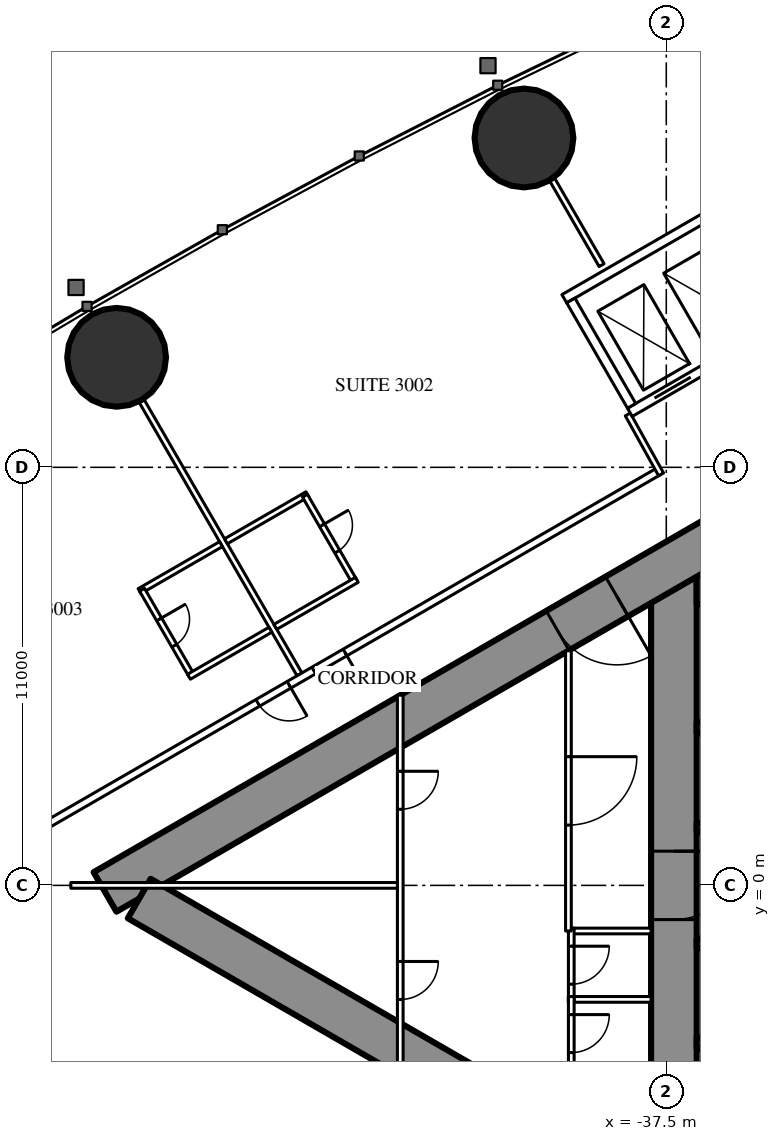
"""IFC4 building model, lengths in metres.
Left out: names, types, materials, properties, quantities, classifications, styles, units other than length and angle.
Written with IfcOpenShell. Run it as: python <this file> out.ifc"""

import sys

from ifc_helpers import new_model, si_unit, direction, frame, frame_2d, origin, origin_2d, place, context, subcontext, project, spatial, rectangle, hollow_circle, extrude, element, fill, save


model = new_model("IFC4")
c1 = context("Model", 3, precision=1e-05, world=origin(), true_north=direction((0.0, 1.0)))
c2 = subcontext(c1, "Body", "Model", "MODEL_VIEW")
j1 = project(units=[si_unit("LENGTHUNIT", "METRE"), si_unit("PLANEANGLEUNIT", "RADIAN")], contexts=[c1])
p1 = place(None, origin())
s1 = spatial("IfcSite", under=j1, at=p1, CompositionType="ELEMENT")
p2 = place(p1, origin())
s2 = spatial("IfcBuilding", under=s1, at=p2, CompositionType="ELEMENT")
p3 = place(p2, frame((0.0, 0.0, 115.1)))
s3 = spatial("IfcBuildingStorey", under=s2, at=p3, CompositionType="ELEMENT", Elevation=115.1)
for number, where, z_axis, x_axis in (
    (1, (-41.245, 19.666, 0.0), (0.0, 0.0, 1.0), (1.0, 0.0, 0.0)),
    (2, (-51.963, 13.895, 0.0), (0.0, 0.0, 1.0), (1.0, 0.0, 0.0)),
):
    element("IfcColumn", number, at=place(p3, frame(where, z_axis=z_axis, x_axis=x_axis)), inside=s3, PredefinedType="COLUMN", context=c2, shape_type="SweptSolid", body=[
        extrude(hollow_circle(Radius=1.3, WallThickness=0.1, at=origin_2d()), origin(), (0.0, 0.0, 1.0), 3.5),
    ])
p4 = place(p3, frame((-37.3, 8.6, 0.0), z_axis=(0.0, 0.0, 1.0), x_axis=(0.0, -1.0, 0.0)))
e3 = element("IfcWall", 3, at=p4, inside=s3, PredefinedType="SHEAR", context=c2, shape_type="SweptSolid", body=[
    extrude(rectangle(XDim=17.2, YDim=1.2, at=frame_2d((8.6, 0.0))), origin(), (0.0, 0.0, 1.0), 3.5),
])
p5 = place(p4, frame((7.7, 0.0, 0.0)))
e4 = element("IfcOpeningElement", 4, at=p5, cuts=e3, PredefinedType="OPENING", context=c2, shape_type="SweptSolid", body=[
    extrude(rectangle(XDim=1.8, YDim=2.2, at=frame_2d((0.9, 1.1))), frame((0.0, 0.61, 0.0), z_axis=(0.0, -1.0, 0.0), x_axis=(1.0, 0.0, 0.0)), (0.0, 0.0, 1.0), 1.22),
])
p6 = place(p3, frame((-28.3, 8.0, 0.0), z_axis=(0.0, 0.0, 1.0), x_axis=(-1.0, 0.0, 0.0)))
e5 = element("IfcWall", 5, at=p6, inside=s3, PredefinedType="SHEAR", context=c2, shape_type="SweptSolid", body=[
    extrude(rectangle(XDim=8.4, YDim=1.2, at=frame_2d((4.2, 0.0))), origin(), (0.0, 0.0, 1.0), 3.5),
])
p7 = place(p6, frame((0.25, 0.0, 0.0)))
e6 = element("IfcOpeningElement", 6, at=p7, cuts=e5, PredefinedType="OPENING", context=c2, shape_type="SweptSolid", body=[
    extrude(rectangle(XDim=1.0, YDim=2.2, at=frame_2d((0.5, 1.1))), frame((0.0, 0.61, 0.0), z_axis=(0.0, -1.0, 0.0), x_axis=(1.0, 0.0, 0.0)), (0.0, 0.0, 1.0), 1.22),
])
for number, where, z_axis, x_axis in (
    (7, (-28.3, 4.15, 0.0), (0.0, 0.0, 1.0), (-1.0, 0.0, 0.0)),
    (8, (-28.3, -4.15, 0.0), (0.0, 0.0, 1.0), (-1.0, 0.0, 0.0)),
):
    element("IfcWall", number, at=place(p3, frame(where, z_axis=z_axis, x_axis=x_axis)), inside=s3, PredefinedType="SHEAR", context=c2, shape_type="SweptSolid", body=[
        extrude(rectangle(XDim=8.4, YDim=0.3, at=frame_2d((4.2, 0.0))), origin(), (0.0, 0.0, 1.0), 3.5),
    ])
for number, where, z_axis, x_axis in (
    (9, (-34.25, 1.525, 0.0), (0.0, 0.0, 1.0), (-1.0, 0.0, 0.0)),
    (10, (-34.25, -1.525, 0.0), (0.0, 0.0, 1.0), (-1.0, 0.0, 0.0)),
):
    element("IfcWall", number, at=place(p3, frame(where, z_axis=z_axis, x_axis=x_axis)), inside=s3, PredefinedType="SHEAR", context=c2, shape_type="SweptSolid", body=[
        extrude(rectangle(XDim=2.45, YDim=0.25, at=frame_2d((1.225, 0.0))), origin(), (0.0, 0.0, 1.0), 3.5),
    ])
p8 = place(p3, frame((-27.2, 14.3, 0.0), z_axis=(0.0, 0.0, 1.0), x_axis=(-0.866026593062, -0.499997940104, 0.0)))
e11 = element("IfcWall", 11, at=p8, inside=s3, PredefinedType="SHEAR", context=c2, shape_type="SweptSolid", body=[
    extrude(rectangle(XDim=28.946, YDim=1.2, at=frame_2d((14.473, 0.0))), origin(), (0.0, 0.0, 1.0), 3.5),
])
p9 = place(p8, frame((4.6, 0.0, 0.0)))
e12 = element("IfcOpeningElement", 12, at=p9, cuts=e11, PredefinedType="OPENING", context=c2, shape_type="SweptSolid", body=[
    extrude(rectangle(XDim=1.0, YDim=2.2, at=frame_2d((0.5, 1.1))), frame((0.0, 0.61, 0.0), z_axis=(0.0, -1.0, 0.0), x_axis=(1.0, 0.0, 0.0)), (0.0, 0.0, 1.0), 1.22),
])
p10 = place(p8, frame((13.395, 0.0, 0.0)))
e13 = element("IfcOpeningElement", 13, at=p10, cuts=e11, PredefinedType="OPENING", context=c2, shape_type="SweptSolid", body=[
    extrude(rectangle(XDim=1.8, YDim=2.2, at=frame_2d((0.9, 1.1))), frame((0.0, 0.61, 0.0), z_axis=(0.0, -1.0, 0.0), x_axis=(1.0, 0.0, 0.0)), (0.0, 0.0, 1.0), 1.22),
])
p11 = place(p3, frame((-27.2, -14.3, 0.0), z_axis=(0.0, 0.0, 1.0), x_axis=(-0.866024021859, 0.500002393557, 0.0)))
e14 = element("IfcWall", 14, at=p11, inside=s3, PredefinedType="SHEAR", context=c2, shape_type="SweptSolid", body=[
    extrude(rectangle(XDim=27.907, YDim=1.2, at=frame_2d((13.954, 0.0))), origin(), (0.0, 0.0, 1.0), 3.5),
])
p12 = place(p11, frame((4.6, 0.0, 0.0)))
e15 = element("IfcOpeningElement", 15, at=p12, cuts=e14, PredefinedType="OPENING", context=c2, shape_type="SweptSolid", body=[
    extrude(rectangle(XDim=1.0, YDim=2.2, at=frame_2d((0.5, 1.1))), frame((0.0, 0.61, 0.0), z_axis=(0.0, -1.0, 0.0), x_axis=(1.0, 0.0, 0.0)), (0.0, 0.0, 1.0), 1.22),
])
p13 = place(p11, frame((13.395, 0.0, 0.0)))
e16 = element("IfcOpeningElement", 16, at=p13, cuts=e14, PredefinedType="OPENING", context=c2, shape_type="SweptSolid", body=[
    extrude(rectangle(XDim=1.8, YDim=2.2, at=frame_2d((0.9, 1.1))), frame((0.0, 0.61, 0.0), z_axis=(0.0, -1.0, 0.0), x_axis=(1.0, 0.0, 0.0)), (0.0, 0.0, 1.0), 1.22),
])
p14 = place(p3, frame((-47.151, 5.552, 0.0), z_axis=(0.0, 0.0, 1.0), x_axis=(-0.500003012045, 0.866023664773, 0.0)))
e17 = element("IfcWall", 17, at=p14, inside=s3, PredefinedType="PARTITIONING", context=c2, shape_type="SweptSolid", body=[
    extrude(rectangle(XDim=8.311, YDim=0.15, at=frame_2d((4.156, 0.0))), origin(), (0.0, 0.0, 1.0), 2.2),
])
p15 = place(p3, frame((-39.202, 16.32, 0.0), z_axis=(0.0, 0.0, 1.0), x_axis=(-0.499947391036, 0.866055775454, 0.0)))
e18 = element("IfcWall", 18, at=p15, inside=s3, PredefinedType="PARTITIONING", context=c2, shape_type="SweptSolid", body=[
    extrude(rectangle(XDim=2.599, YDim=0.15, at=frame_2d((1.3, 0.0))), origin(), (0.0, 0.0, 1.0), 3.25),
])
p16 = place(p3, frame((-37.7, 10.894, 0.0), z_axis=(0.0, 0.0, 1.0), x_axis=(-0.866027905338, -0.499995667157, 0.0)))
e19 = element("IfcWall", 19, at=p16, inside=s3, PredefinedType="PARTITIONING", context=c2, shape_type="SweptSolid", body=[
    extrude(rectangle(XDim=21.787, YDim=0.2, at=frame_2d((10.894, 0.0))), origin(), (0.0, 0.0, 1.0), 3.25),
])
p17 = place(p16, frame((11.23, 0.0, 0.0)))
e20 = element("IfcOpeningElement", 20, at=p17, cuts=e19, PredefinedType="OPENING", context=c2, shape_type="SweptSolid", body=[
    extrude(rectangle(XDim=0.95, YDim=2.2, at=frame_2d((0.475, 1.1))), frame((0.0, 0.11, 0.0), z_axis=(0.0, -1.0, 0.0), x_axis=(1.0, 0.0, 0.0)), (0.0, 0.0, 1.0), 0.22),
])
p18 = place(p16, frame((9.531, 0.0, 0.0)))
e21 = element("IfcOpeningElement", 21, at=p18, cuts=e19, PredefinedType="OPENING", context=c2, shape_type="SweptSolid", body=[
    extrude(rectangle(XDim=0.95, YDim=2.2, at=frame_2d((0.475, 1.1))), frame((0.0, 0.11, 0.0), z_axis=(0.0, -1.0, 0.0), x_axis=(1.0, 0.0, 0.0)), (0.0, 0.0, 1.0), 0.22),
])
p19 = place(p3, frame((-38.513, 12.392, 0.0), z_axis=(0.0, 0.0, 1.0), x_axis=(0.485585508183, -0.874189175317, 0.0)))
e22 = element("IfcWall", 22, at=p19, inside=s3, PredefinedType="PARTITIONING", context=c2, shape_type="SweptSolid", body=[
    extrude(rectangle(XDim=1.805, YDim=0.15, at=frame_2d((0.902, 0.0))), origin(), (0.0, 0.0, 1.0), 3.25),
])
p20 = place(p3, frame((-49.216, 8.979, 0.0), z_axis=(0.0, 0.0, 1.0), x_axis=(-0.866031185235, -0.4999899861, 0.0)))
e23 = element("IfcWall", 23, at=p20, inside=s3, PredefinedType="PARTITIONING", context=c2, shape_type="SweptSolid", body=[
    extrude(rectangle(XDim=2.475, YDim=0.15, at=frame_2d((1.238, 0.0))), origin(), (0.0, 0.0, 1.0), 3.25),
])
p21 = place(p3, frame((-49.995, 5.527, 0.0), z_axis=(0.0, 0.0, 1.0), x_axis=(-0.500006934395, 0.866021400173, 0.0)))
e24 = element("IfcWall", 24, at=p21, inside=s3, PredefinedType="PARTITIONING", context=c2, shape_type="SweptSolid", body=[
    extrude(rectangle(XDim=2.6, YDim=0.15, at=frame_2d((1.3, 0.0))), origin(), (0.0, 0.0, 1.0), 3.25),
])
p22 = place(p21, frame((0.9, 0.0, 0.0)))
e25 = element("IfcOpeningElement", 25, at=p22, cuts=e24, PredefinedType="OPENING", context=c2, shape_type="SweptSolid", body=[
    extrude(rectangle(XDim=0.8, YDim=2.2, at=frame_2d((0.4, 1.1))), frame((0.0, 0.085, 0.0), z_axis=(0.0, -1.0, 0.0), x_axis=(1.0, 0.0, 0.0)), (0.0, 0.0, 1.0), 0.17),
])
p23 = place(p3, frame((-47.916, 6.727, 0.0), z_axis=(0.0, 0.0, 1.0), x_axis=(-0.866031185235, -0.4999899861, 0.0)))
e26 = element("IfcWall", 26, at=p23, inside=s3, PredefinedType="PARTITIONING", context=c2, shape_type="SweptSolid", body=[
    extrude(rectangle(XDim=2.475, YDim=0.15, at=frame_2d((1.238, 0.0))), origin(), (0.0, 0.0, 1.0), 3.25),
])
p24 = place(p3, frame((-46.943, 10.292, 0.0), z_axis=(0.0, 0.0, 1.0), x_axis=(-0.866006523861, -0.500032699561, 0.0)))
e27 = element("IfcWall", 27, at=p24, inside=s3, PredefinedType="PARTITIONING", context=c2, shape_type="SweptSolid", body=[
    extrude(rectangle(XDim=2.475, YDim=0.15, at=frame_2d((1.237, 0.0))), origin(), (0.0, 0.0, 1.0), 3.25),
])
p25 = place(p3, frame((-45.708, 8.002, 0.0), z_axis=(0.0, 0.0, 1.0), x_axis=(-0.500047596559, 0.865997922154, 0.0)))
e28 = element("IfcWall", 28, at=p25, inside=s3, PredefinedType="PARTITIONING", context=c2, shape_type="SweptSolid", body=[
    extrude(rectangle(XDim=2.6, YDim=0.15, at=frame_2d((1.3, 0.0))), origin(), (0.0, 0.0, 1.0), 3.25),
])
p26 = place(p25, frame((0.9, 0.0, 0.0)))
e29 = element("IfcOpeningElement", 29, at=p26, cuts=e28, PredefinedType="OPENING", context=c2, shape_type="SweptSolid", body=[
    extrude(rectangle(XDim=0.8, YDim=2.2, at=frame_2d((0.4, 1.1))), frame((0.0, 0.085, 0.0), z_axis=(0.0, -1.0, 0.0), x_axis=(1.0, 0.0, 0.0)), (0.0, 0.0, 1.0), 0.17),
])
p27 = place(p3, frame((-45.643, 8.04, 0.0), z_axis=(0.0, 0.0, 1.0), x_axis=(-0.866006523861, -0.500032699561, 0.0)))
e30 = element("IfcWall", 30, at=p27, inside=s3, PredefinedType="PARTITIONING", context=c2, shape_type="SweptSolid", body=[
    extrude(rectangle(XDim=2.475, YDim=0.15, at=frame_2d((1.237, 0.0))), origin(), (0.0, 0.0, 1.0), 3.25),
])
for number, where, z_axis, x_axis in (
    (31, (-37.9, -1.2, 0.0), (0.0, 0.0, 1.0), (-1.0, 0.0, 0.0)),
    (32, (-37.9, -3.0, 0.0), (0.0, 0.0, 1.0), (-1.0, 0.0, 0.0)),
):
    element("IfcWall", number, at=place(p3, frame(where, z_axis=z_axis, x_axis=x_axis)), inside=s3, PredefinedType="PARTITIONING", context=c2, shape_type="SweptSolid", body=[
        extrude(rectangle(XDim=2.175, YDim=0.15, at=frame_2d((1.087, 0.0))), origin(), (0.0, 0.0, 1.0), 3.25),
    ])
p28 = place(p3, frame((-40.0, -1.125, 0.0), z_axis=(0.0, 0.0, 1.0), x_axis=(0.0, -1.0, 0.0)))
e33 = element("IfcWall", 33, at=p28, inside=s3, PredefinedType="PARTITIONING", context=c2, shape_type="SweptSolid", body=[
    extrude(rectangle(XDim=1.95, YDim=0.15, at=frame_2d((0.975, 0.0))), origin(), (0.0, 0.0, 1.0), 3.25),
])
p29 = place(p28, frame((0.475, 0.0, 0.0)))
e34 = element("IfcOpeningElement", 34, at=p29, cuts=e33, PredefinedType="OPENING", context=c2, shape_type="SweptSolid", body=[
    extrude(rectangle(XDim=1.0, YDim=2.2, at=frame_2d((0.5, 1.1))), frame((0.0, 0.085, 0.0), z_axis=(0.0, -1.0, 0.0), x_axis=(1.0, 0.0, 0.0)), (0.0, 0.0, 1.0), 0.17),
])
p30 = place(p3, frame((-40.0, -2.925, 0.0), z_axis=(0.0, 0.0, 1.0), x_axis=(0.0, -1.0, 0.0)))
e35 = element("IfcWall", 35, at=p30, inside=s3, PredefinedType="PARTITIONING", context=c2, shape_type="SweptSolid", body=[
    extrude(rectangle(XDim=1.95, YDim=0.15, at=frame_2d((0.975, 0.0))), origin(), (0.0, 0.0, 1.0), 3.25),
])
p31 = place(p30, frame((0.475, 0.0, 0.0)))
e36 = element("IfcOpeningElement", 36, at=p31, cuts=e35, PredefinedType="OPENING", context=c2, shape_type="SweptSolid", body=[
    extrude(rectangle(XDim=1.0, YDim=2.2, at=frame_2d((0.5, 1.1))), frame((0.0, 0.085, 0.0), z_axis=(0.0, -1.0, 0.0), x_axis=(1.0, 0.0, 0.0)), (0.0, 0.0, 1.0), 0.17),
])
p32 = place(p3, frame((-40.075, 6.174, 0.0), z_axis=(0.0, 0.0, 1.0), x_axis=(0.0, -1.0, 0.0)))
e37 = element("IfcWall", 37, at=p32, inside=s3, PredefinedType="PARTITIONING", context=c2, shape_type="SweptSolid", body=[
    extrude(rectangle(XDim=7.374, YDim=0.15, at=frame_2d((3.687, 0.0))), origin(), (0.0, 0.0, 1.0), 3.25),
])
p33 = place(p32, frame((2.787, 0.0, 0.0)))
e38 = element("IfcOpeningElement", 38, at=p33, cuts=e37, PredefinedType="OPENING", context=c2, shape_type="SweptSolid", body=[
    extrude(rectangle(XDim=1.8, YDim=2.2, at=frame_2d((0.9, 1.1))), frame((0.0, 0.085, 0.0), z_axis=(0.0, -1.0, 0.0), x_axis=(1.0, 0.0, 0.0)), (0.0, 0.0, 1.0), 0.17),
])
p34 = place(p3, frame((-44.5, 5.005, 0.0), z_axis=(0.0, 0.0, 1.0), x_axis=(0.0, -1.0, 0.0)))
e39 = element("IfcWall", 39, at=p34, inside=s3, PredefinedType="PARTITIONING", context=c2, shape_type="SweptSolid", body=[
    extrude(rectangle(XDim=10.009, YDim=0.15, at=frame_2d((5.005, 0.0))), origin(), (0.0, 0.0, 1.0), 2.45),
])
p35 = place(p34, frame((2.002, 0.0, 0.0)))
e40 = element("IfcOpeningElement", 40, at=p35, cuts=e39, PredefinedType="OPENING", context=c2, shape_type="SweptSolid", body=[
    extrude(rectangle(XDim=1.0, YDim=2.2, at=frame_2d((0.5, 1.1))), frame((0.0, 0.085, 0.0), z_axis=(0.0, -1.0, 0.0), x_axis=(1.0, 0.0, 0.0)), (0.0, 0.0, 1.0), 0.17),
])
p36 = place(p34, frame((7.007, 0.0, 0.0)))
e41 = element("IfcOpeningElement", 41, at=p36, cuts=e39, PredefinedType="OPENING", context=c2, shape_type="SweptSolid", body=[
    extrude(rectangle(XDim=1.0, YDim=2.2, at=frame_2d((0.5, 1.1))), frame((0.0, 0.085, 0.0), z_axis=(0.0, -1.0, 0.0), x_axis=(1.0, 0.0, 0.0)), (0.0, 0.0, 1.0), 0.17),
])
p37 = place(p3, frame((-44.575, 0.0, 0.0), z_axis=(0.0, 0.0, 1.0), x_axis=(-1.0, 0.0, 0.0)))
e42 = element("IfcWall", 42, at=p37, inside=s3, PredefinedType="PARTITIONING", context=c2, shape_type="SweptSolid", body=[
    extrude(rectangle(XDim=8.593, YDim=0.15, at=frame_2d((4.297, 0.0))), origin(), (0.0, 0.0, 1.0), 2.2),
])
p38 = place(p3, frame((-31.01, 16.747, 0.0), z_axis=(0.0, 0.0, 1.0), x_axis=(-0.866028165386, -0.499995216735, 0.0)))
e43 = element("IfcWall", 43, at=p38, inside=s3, PredefinedType="PARTITIONING", context=c2, shape_type="SweptSolid", body=[
    extrude(rectangle(XDim=8.6, YDim=0.25, at=frame_2d((4.3, 0.0))), origin(), (0.0, 0.0, 1.0), 3.25),
])
p39 = place(p38, frame((0.75, 0.0, 0.0)))
e44 = element("IfcOpeningElement", 44, at=p39, cuts=e43, PredefinedType="OPENING", context=c2, shape_type="SweptSolid", body=[
    extrude(rectangle(XDim=1.1, YDim=2.2, at=frame_2d((0.55, 1.1))), frame((0.0, 0.135, 0.0), z_axis=(0.0, -1.0, 0.0), x_axis=(1.0, 0.0, 0.0)), (0.0, 0.0, 1.0), 0.27),
])
p40 = place(p38, frame((2.75, 0.0, 0.0)))
e45 = element("IfcOpeningElement", 45, at=p40, cuts=e43, PredefinedType="OPENING", context=c2, shape_type="SweptSolid", body=[
    extrude(rectangle(XDim=1.1, YDim=2.2, at=frame_2d((0.55, 1.1))), frame((0.0, 0.135, 0.0), z_axis=(0.0, -1.0, 0.0), x_axis=(1.0, 0.0, 0.0)), (0.0, 0.0, 1.0), 0.27),
])
p41 = place(p38, frame((4.75, 0.0, 0.0)))
e46 = element("IfcOpeningElement", 46, at=p41, cuts=e43, PredefinedType="OPENING", context=c2, shape_type="SweptSolid", body=[
    extrude(rectangle(XDim=1.1, YDim=2.2, at=frame_2d((0.55, 1.1))), frame((0.0, 0.135, 0.0), z_axis=(0.0, -1.0, 0.0), x_axis=(1.0, 0.0, 0.0)), (0.0, 0.0, 1.0), 0.27),
])
p42 = place(p38, frame((6.75, 0.0, 0.0)))
e47 = element("IfcOpeningElement", 47, at=p42, cuts=e43, PredefinedType="OPENING", context=c2, shape_type="SweptSolid", body=[
    extrude(rectangle(XDim=1.1, YDim=2.2, at=frame_2d((0.55, 1.1))), frame((0.0, 0.135, 0.0), z_axis=(0.0, -1.0, 0.0), x_axis=(1.0, 0.0, 0.0)), (0.0, 0.0, 1.0), 0.27),
])
p43 = place(p3, frame((-32.736, 19.736, 0.0), z_axis=(0.0, 0.0, 1.0), x_axis=(-0.866028165386, -0.499995216735, 0.0)))
e48 = element("IfcWall", 48, at=p43, inside=s3, PredefinedType="PARTITIONING", context=c2, shape_type="SweptSolid", body=[
    extrude(rectangle(XDim=8.6, YDim=0.25, at=frame_2d((4.3, 0.0))), origin(), (0.0, 0.0, 1.0), 3.25),
])
p44 = place(p3, frame((-38.413, 12.618, 0.0), z_axis=(0.0, 0.0, 1.0), x_axis=(-0.499872130319, 0.866099216793, 0.0)))
e49 = element("IfcWall", 49, at=p44, inside=s3, PredefinedType="PARTITIONING", context=c2, shape_type="SweptSolid", body=[
    extrude(rectangle(XDim=3.2, YDim=0.25, at=frame_2d((1.6, 0.0))), origin(), (0.0, 0.0, 1.0), 3.25),
])
p45 = place(p22, origin())
e50 = element("IfcDoor", 50, at=p45, inside=s3, OperationType="SINGLE_SWING_RIGHT", PredefinedType="DOOR", context=c2, shape_type="SweptSolid", body=[
    extrude(rectangle(XDim=0.8, YDim=2.2, at=frame_2d((0.4, 1.1))), frame((0.0, 0.025, 0.0), z_axis=(0.0, -1.0, 0.0), x_axis=(1.0, 0.0, 0.0)), (0.0, 0.0, 1.0), 0.05),
])
fill(e25, e50)
p46 = place(p17, origin())
e51 = element("IfcDoor", 51, at=p46, inside=s3, OperationType="SINGLE_SWING_LEFT", PredefinedType="DOOR", context=c2, shape_type="SweptSolid", body=[
    extrude(rectangle(XDim=0.95, YDim=2.2, at=frame_2d((0.475, 1.1))), frame((0.0, 0.025, 0.0), z_axis=(0.0, -1.0, 0.0), x_axis=(1.0, 0.0, 0.0)), (0.0, 0.0, 1.0), 0.05),
])
fill(e20, e51)
p47 = place(p26, origin())
e52 = element("IfcDoor", 52, at=p47, inside=s3, OperationType="SINGLE_SWING_RIGHT", PredefinedType="DOOR", context=c2, shape_type="SweptSolid", body=[
    extrude(rectangle(XDim=0.8, YDim=2.2, at=frame_2d((0.4, 1.1))), frame((0.0, 0.025, 0.0), z_axis=(0.0, -1.0, 0.0), x_axis=(1.0, 0.0, 0.0)), (0.0, 0.0, 1.0), 0.05),
])
fill(e29, e52)
p48 = place(p18, origin())
e53 = element("IfcDoor", 53, at=p48, inside=s3, OperationType="SINGLE_SWING_LEFT", PredefinedType="DOOR", context=c2, shape_type="SweptSolid", body=[
    extrude(rectangle(XDim=0.95, YDim=2.2, at=frame_2d((0.475, 1.1))), frame((0.0, 0.025, 0.0), z_axis=(0.0, -1.0, 0.0), x_axis=(1.0, 0.0, 0.0)), (0.0, 0.0, 1.0), 0.05),
])
fill(e21, e53)
p49 = place(p29, origin())
e54 = element("IfcDoor", 54, at=p49, inside=s3, OperationType="SINGLE_SWING_LEFT", PredefinedType="DOOR", context=c2, shape_type="SweptSolid", body=[
    extrude(rectangle(XDim=1.0, YDim=2.2, at=frame_2d((0.5, 1.1))), frame((0.0, 0.025, 0.0), z_axis=(0.0, -1.0, 0.0), x_axis=(1.0, 0.0, 0.0)), (0.0, 0.0, 1.0), 0.05),
])
fill(e34, e54)
p50 = place(p31, origin())
e55 = element("IfcDoor", 55, at=p50, inside=s3, OperationType="SINGLE_SWING_LEFT", PredefinedType="DOOR", context=c2, shape_type="SweptSolid", body=[
    extrude(rectangle(XDim=1.0, YDim=2.2, at=frame_2d((0.5, 1.1))), frame((0.0, 0.025, 0.0), z_axis=(0.0, -1.0, 0.0), x_axis=(1.0, 0.0, 0.0)), (0.0, 0.0, 1.0), 0.05),
])
fill(e36, e55)
p51 = place(p33, origin())
e56 = element("IfcDoor", 56, at=p51, inside=s3, OperationType="DOUBLE_DOOR_SINGLE_SWING", PredefinedType="DOOR", context=c2, shape_type="SweptSolid", body=[
    extrude(rectangle(XDim=1.8, YDim=2.2, at=frame_2d((0.9, 1.1))), frame((0.0, 0.025, 0.0), z_axis=(0.0, -1.0, 0.0), x_axis=(1.0, 0.0, 0.0)), (0.0, 0.0, 1.0), 0.05),
])
fill(e38, e56)
p52 = place(p35, origin())
e57 = element("IfcDoor", 57, at=p52, inside=s3, OperationType="SINGLE_SWING_LEFT", PredefinedType="DOOR", context=c2, shape_type="SweptSolid", body=[
    extrude(rectangle(XDim=1.0, YDim=2.2, at=frame_2d((0.5, 1.1))), frame((0.0, 0.025, 0.0), z_axis=(0.0, -1.0, 0.0), x_axis=(1.0, 0.0, 0.0)), (0.0, 0.0, 1.0), 0.05),
])
fill(e40, e57)
p53 = place(p36, origin())
e58 = element("IfcDoor", 58, at=p53, inside=s3, OperationType="SINGLE_SWING_LEFT", PredefinedType="DOOR", context=c2, shape_type="SweptSolid", body=[
    extrude(rectangle(XDim=1.0, YDim=2.2, at=frame_2d((0.5, 1.1))), frame((0.0, 0.025, 0.0), z_axis=(0.0, -1.0, 0.0), x_axis=(1.0, 0.0, 0.0)), (0.0, 0.0, 1.0), 0.05),
])
fill(e41, e58)
p54 = place(p10, origin())
e59 = element("IfcDoor", 59, at=p54, inside=s3, OperationType="DOUBLE_DOOR_SINGLE_SWING", PredefinedType="DOOR", context=c2, shape_type="SweptSolid", body=[
    extrude(rectangle(XDim=1.8, YDim=2.2, at=frame_2d((0.9, 1.1))), frame((0.0, 0.025, 0.0), z_axis=(0.0, -1.0, 0.0), x_axis=(1.0, 0.0, 0.0)), (0.0, 0.0, 1.0), 0.05),
])
fill(e13, e59)
p55 = place(p5, origin())
e60 = element("IfcDoor", 60, at=p55, inside=s3, OperationType="DOUBLE_DOOR_SINGLE_SWING", PredefinedType="DOOR", context=c2, shape_type="SweptSolid", body=[
    extrude(rectangle(XDim=1.8, YDim=2.2, at=frame_2d((0.9, 1.1))), frame((0.0, 0.025, 0.0), z_axis=(0.0, -1.0, 0.0), x_axis=(1.0, 0.0, 0.0)), (0.0, 0.0, 1.0), 0.05),
])
fill(e4, e60)
p56 = place(p42, origin())
e61 = element("IfcDoor", 61, at=p56, inside=s3, OperationType="DOUBLE_DOOR_SLIDING", PredefinedType="USERDEFINED", context=c2, shape_type="SweptSolid", body=[
    extrude(rectangle(XDim=1.1, YDim=2.2, at=frame_2d((0.55, 1.1))), frame((0.0, 0.025, 0.0), z_axis=(0.0, -1.0, 0.0), x_axis=(1.0, 0.0, 0.0)), (0.0, 0.0, 1.0), 0.05),
])
fill(e47, e61)
save(model, sys.argv[1])
